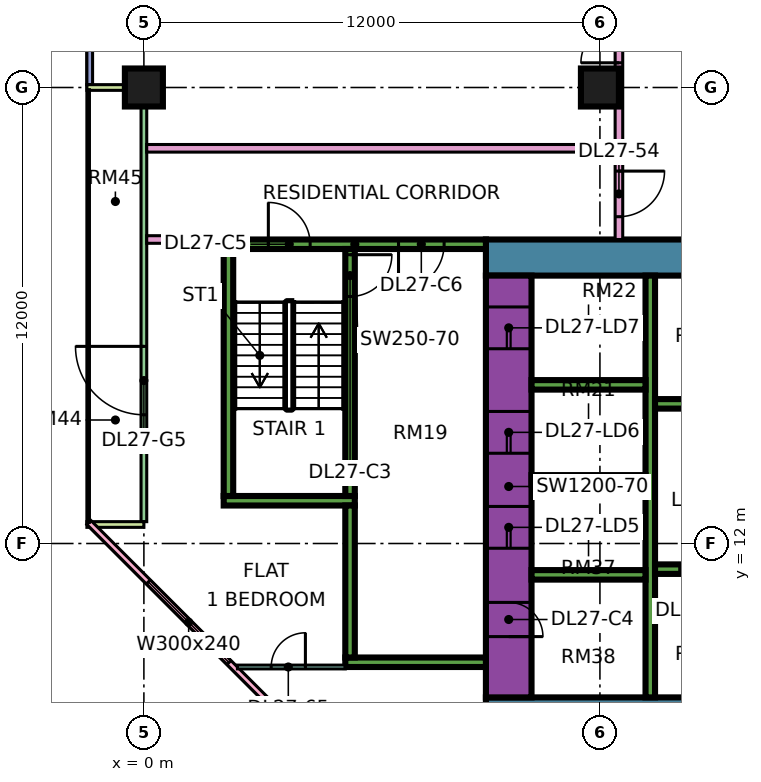
"""IFC4 building model, lengths in metres.
Left out: names, types, materials, properties, quantities, classifications, styles, units other than length and angle.
Written with IfcOpenShell. Run it as: python <this file> out.ifc"""

import sys

from ifc_helpers import new_model, si_unit, direction, frame, frame_2d, origin, origin_2d, place, context, subcontext, project, spatial, rectangle, extrude, element, fill, save


model = new_model("IFC4")
c1 = context("Model", 3, precision=1e-05, world=origin(), true_north=direction((0.0, 1.0)))
c2 = subcontext(c1, "Body", "Model", "MODEL_VIEW")
j1 = project(units=[si_unit("LENGTHUNIT", "METRE"), si_unit("PLANEANGLEUNIT", "RADIAN")], contexts=[c1])
p1 = place(None, origin())
s1 = spatial("IfcSite", under=j1, at=p1, CompositionType="ELEMENT")
p2 = place(p1, origin())
s2 = spatial("IfcBuilding", under=s1, at=p2, CompositionType="ELEMENT")
p3 = place(p2, frame((0.0, 0.0, 118.15)))
s3 = spatial("IfcBuildingStorey", under=s2, at=p3, CompositionType="ELEMENT", Elevation=118.15)
for number, where, z_axis, x_axis in (
    (1, (0.0, 24.0, 0.0), (0.0, 0.0, 1.0), (1.0, 0.0, 0.0)),
    (2, (12.0, 24.0, 0.0), (0.0, 0.0, 1.0), (1.0, 0.0, 0.0)),
):
    element("IfcColumn", number, at=place(p3, frame(where, z_axis=z_axis, x_axis=x_axis)), inside=s3, PredefinedType="COLUMN", context=c2, shape_type="SweptSolid", body=[
        extrude(rectangle(XDim=1.0, YDim=1.0, at=origin_2d()), origin(), (0.0, 0.0, 1.0), 3.75),
    ])
p4 = place(p3, frame((9.0, 7.475, 0.0), z_axis=(0.0, 0.0, 1.0), x_axis=(1.0, 0.0, 0.0)))
e3 = element("IfcWall", 3, at=p4, inside=s3, PredefinedType="SHEAR", context=c2, shape_type="SweptSolid", body=[
    extrude(rectangle(XDim=25.0, YDim=0.95, at=frame_2d((12.5, 0.0))), origin(), (0.0, 0.0, 1.0), 3.75),
])
p5 = place(p3, frame((9.0, 19.525, 0.0), z_axis=(0.0, 0.0, 1.0), x_axis=(1.0, 0.0, 0.0)))
e4 = element("IfcWall", 4, at=p5, inside=s3, PredefinedType="SHEAR", context=c2, shape_type="SweptSolid", body=[
    extrude(rectangle(XDim=25.0, YDim=0.95, at=frame_2d((12.5, 0.0))), origin(), (0.0, 0.0, 1.0), 3.75),
])
p6 = place(p5, frame((19.1, 0.0, 0.0)))
e5 = element("IfcOpeningElement", 5, at=p6, cuts=e4, PredefinedType="OPENING", context=c2, shape_type="SweptSolid", body=[
    extrude(rectangle(XDim=1.8, YDim=2.4, at=frame_2d((0.9, 1.2))), frame((0.0, 0.485, 0.0), z_axis=(0.0, -1.0, 0.0), x_axis=(1.0, 0.0, 0.0)), (0.0, 0.0, 1.0), 0.97),
])
p7 = place(p3, frame((9.6, 7.95, 0.0), z_axis=(0.0, 0.0, 1.0), x_axis=(0.0, 1.0, 0.0)))
e6 = element("IfcWall", 6, at=p7, inside=s3, PredefinedType="SHEAR", context=c2, shape_type="SweptSolid", body=[
    extrude(rectangle(XDim=11.1, YDim=1.2, at=frame_2d((5.55, 0.0))), origin(), (0.0, 0.0, 1.0), 3.75),
])
p8 = place(p7, frame((3.925, 0.0, 0.0)))
e7 = element("IfcOpeningElement", 7, at=p8, cuts=e6, PredefinedType="OPENING", context=c2, shape_type="SweptSolid", body=[
    extrude(rectangle(XDim=1.1, YDim=2.2, at=frame_2d((0.55, 1.1))), frame((0.0, 0.61, 0.0), z_axis=(0.0, -1.0, 0.0), x_axis=(1.0, 0.0, 0.0)), (0.0, 0.0, 1.0), 1.22),
])
p9 = place(p7, frame((6.425, 0.0, 0.0)))
e8 = element("IfcOpeningElement", 8, at=p9, cuts=e6, PredefinedType="OPENING", context=c2, shape_type="SweptSolid", body=[
    extrude(rectangle(XDim=1.1, YDim=2.2, at=frame_2d((0.55, 1.1))), frame((0.0, 0.61, 0.0), z_axis=(0.0, -1.0, 0.0), x_axis=(1.0, 0.0, 0.0)), (0.0, 0.0, 1.0), 1.22),
])
p10 = place(p7, frame((9.175, 0.0, 0.0)))
e9 = element("IfcOpeningElement", 9, at=p10, cuts=e6, PredefinedType="OPENING", context=c2, shape_type="SweptSolid", body=[
    extrude(rectangle(XDim=1.1, YDim=2.2, at=frame_2d((0.55, 1.1))), frame((0.0, 0.61, 0.0), z_axis=(0.0, -1.0, 0.0), x_axis=(1.0, 0.0, 0.0)), (0.0, 0.0, 1.0), 1.22),
])
p11 = place(p7, frame((1.6, 0.0, 0.0)))
e10 = element("IfcOpeningElement", 10, at=p11, cuts=e6, PredefinedType="OPENING", context=c2, shape_type="SweptSolid", body=[
    extrude(rectangle(XDim=0.9, YDim=2.1, at=frame_2d((0.45, 1.05))), frame((0.0, 0.61, 0.0), z_axis=(0.0, -1.0, 0.0), x_axis=(1.0, 0.0, 0.0)), (0.0, 0.0, 1.0), 1.22),
])
p12 = place(p3, frame((13.325, 7.95, 0.0), z_axis=(0.0, 0.0, 1.0), x_axis=(0.0, 1.0, 0.0)))
e11 = element("IfcWall", 11, at=p12, inside=s3, PredefinedType="SHEAR", context=c2, shape_type="SweptSolid", body=[
    extrude(rectangle(XDim=11.1, YDim=0.25, at=frame_2d((5.55, 0.0))), origin(), (0.0, 0.0, 1.0), 3.75),
])
p13 = place(p3, frame((13.45, 11.325, 0.0), z_axis=(0.0, 0.0, 1.0), x_axis=(1.0, 0.0, 0.0)))
e12 = element("IfcWall", 12, at=p13, inside=s3, PredefinedType="SHEAR", context=c2, shape_type="SweptSolid", body=[
    extrude(rectangle(XDim=19.6, YDim=0.25, at=frame_2d((9.8, 0.0))), origin(), (0.0, 0.0, 1.0), 3.75),
])
p14 = place(p13, frame((0.65, 0.0, 0.0)))
e13 = element("IfcOpeningElement", 13, at=p14, cuts=e12, PredefinedType="OPENING", context=c2, shape_type="SweptSolid", body=[
    extrude(rectangle(XDim=1.2, YDim=2.2, at=frame_2d((0.6, 1.1))), frame((0.0, 0.135, 0.0), z_axis=(0.0, -1.0, 0.0), x_axis=(1.0, 0.0, 0.0)), (0.0, 0.0, 1.0), 0.27),
])
p15 = place(p13, frame((3.4, 0.0, 0.0)))
e14 = element("IfcOpeningElement", 14, at=p15, cuts=e12, PredefinedType="OPENING", context=c2, shape_type="SweptSolid", body=[
    extrude(rectangle(XDim=1.2, YDim=2.2, at=frame_2d((0.6, 1.1))), frame((0.0, 0.135, 0.0), z_axis=(0.0, -1.0, 0.0), x_axis=(1.0, 0.0, 0.0)), (0.0, 0.0, 1.0), 0.27),
])
p16 = place(p13, frame((6.15, 0.0, 0.0)))
e15 = element("IfcOpeningElement", 15, at=p16, cuts=e12, PredefinedType="OPENING", context=c2, shape_type="SweptSolid", body=[
    extrude(rectangle(XDim=1.2, YDim=2.2, at=frame_2d((0.6, 1.1))), frame((0.0, 0.135, 0.0), z_axis=(0.0, -1.0, 0.0), x_axis=(1.0, 0.0, 0.0)), (0.0, 0.0, 1.0), 0.27),
])
p17 = place(p13, frame((8.9, 0.0, 0.0)))
e16 = element("IfcOpeningElement", 16, at=p17, cuts=e12, PredefinedType="OPENING", context=c2, shape_type="SweptSolid", body=[
    extrude(rectangle(XDim=1.2, YDim=2.2, at=frame_2d((0.6, 1.1))), frame((0.0, 0.135, 0.0), z_axis=(0.0, -1.0, 0.0), x_axis=(1.0, 0.0, 0.0)), (0.0, 0.0, 1.0), 0.27),
])
p18 = place(p3, frame((13.45, 15.675, 0.0), z_axis=(0.0, 0.0, 1.0), x_axis=(1.0, 0.0, 0.0)))
e17 = element("IfcWall", 17, at=p18, inside=s3, PredefinedType="SHEAR", context=c2, shape_type="SweptSolid", body=[
    extrude(rectangle(XDim=13.75, YDim=0.25, at=frame_2d((6.875, 0.0))), origin(), (0.0, 0.0, 1.0), 3.75),
])
for number, where, z_axis, x_axis in (
    (18, (10.2, 11.175, 0.0), (0.0, 0.0, 1.0), (1.0, 0.0, 0.0)),
    (19, (10.2, 13.675, 0.0), (0.0, 0.0, 1.0), (1.0, 0.0, 0.0)),
    (20, (10.2, 16.175, 0.0), (0.0, 0.0, 1.0), (1.0, 0.0, 0.0)),
):
    element("IfcWall", number, at=place(p3, frame(where, z_axis=z_axis, x_axis=x_axis)), inside=s3, PredefinedType="SHEAR", context=c2, shape_type="SweptSolid", body=[
        extrude(rectangle(XDim=3.0, YDim=0.25, at=frame_2d((1.5, 0.0))), origin(), (0.0, 0.0, 1.0), 3.75),
    ])
p19 = place(p3, frame((2.1, 19.875, 0.0), z_axis=(0.0, 0.0, 1.0), x_axis=(1.0, 0.0, 0.0)))
e21 = element("IfcWall", 21, at=p19, inside=s3, PredefinedType="SHEAR", context=c2, shape_type="SweptSolid", body=[
    extrude(rectangle(XDim=6.9, YDim=0.25, at=frame_2d((3.45, 0.0))), origin(), (0.0, 0.0, 1.0), 3.75),
])
p20 = place(p19, frame((1.175, 0.0, 0.0)))
e22 = element("IfcOpeningElement", 22, at=p20, cuts=e21, PredefinedType="OPENING", context=c2, shape_type="SweptSolid", body=[
    extrude(rectangle(XDim=1.1, YDim=2.2, at=frame_2d((0.55, 1.1))), frame((0.0, 0.135, 0.0), z_axis=(0.0, -1.0, 0.0), x_axis=(1.0, 0.0, 0.0)), (0.0, 0.0, 1.0), 0.27),
])
p21 = place(p19, frame((4.6, 0.0, 0.0)))
e23 = element("IfcOpeningElement", 23, at=p21, cuts=e21, PredefinedType="OPENING", context=c2, shape_type="SweptSolid", body=[
    extrude(rectangle(XDim=1.2, YDim=2.2, at=frame_2d((0.6, 1.1))), frame((0.0, 0.135, 0.0), z_axis=(0.0, -1.0, 0.0), x_axis=(1.0, 0.0, 0.0)), (0.0, 0.0, 1.0), 0.27),
])
p22 = place(p3, frame((2.1, 13.125, 0.0), z_axis=(0.0, 0.0, 1.0), x_axis=(1.0, 0.0, 0.0)))
e24 = element("IfcWall", 24, at=p22, inside=s3, PredefinedType="SHEAR", context=c2, shape_type="SweptSolid", body=[
    extrude(rectangle(XDim=3.45, YDim=0.25, at=frame_2d((1.725, 0.0))), origin(), (0.0, 0.0, 1.0), 3.75),
])
p23 = place(p3, frame((2.225, 13.25, 0.0), z_axis=(0.0, 0.0, 1.0), x_axis=(0.0, 1.0, 0.0)))
e25 = element("IfcWall", 25, at=p23, inside=s3, PredefinedType="SHEAR", context=c2, shape_type="SweptSolid", body=[
    extrude(rectangle(XDim=6.5, YDim=0.25, at=frame_2d((3.25, 0.0))), origin(), (0.0, 0.0, 1.0), 3.75),
])
p24 = place(p3, frame((5.425, 13.25, 0.0), z_axis=(0.0, 0.0, 1.0), x_axis=(0.0, 1.0, 0.0)))
e26 = element("IfcWall", 26, at=p24, inside=s3, PredefinedType="SHEAR", context=c2, shape_type="SweptSolid", body=[
    extrude(rectangle(XDim=6.5, YDim=0.25, at=frame_2d((3.25, 0.0))), origin(), (0.0, 0.0, 1.0), 3.75),
])
p25 = place(p24, frame((5.25, 0.0, 0.0)))
e27 = element("IfcOpeningElement", 27, at=p25, cuts=e26, PredefinedType="OPENING", context=c2, shape_type="SweptSolid", body=[
    extrude(rectangle(XDim=1.1, YDim=2.2, at=frame_2d((0.55, 1.1))), frame((0.0, 0.135, 0.0), z_axis=(0.0, -1.0, 0.0), x_axis=(1.0, 0.0, 0.0)), (0.0, 0.0, 1.0), 0.27),
])
p26 = place(p3, frame((5.3, 8.875, 0.0), z_axis=(0.0, 0.0, 1.0), x_axis=(1.0, 0.0, 0.0)))
e28 = element("IfcWall", 28, at=p26, inside=s3, PredefinedType="SHEAR", context=c2, shape_type="SweptSolid", body=[
    extrude(rectangle(XDim=3.7, YDim=0.25, at=frame_2d((1.85, 0.0))), origin(), (0.0, 0.0, 1.0), 3.75),
])
p27 = place(p3, frame((5.425, 9.0, 0.0), z_axis=(0.0, 0.0, 1.0), x_axis=(0.0, 1.0, 0.0)))
e29 = element("IfcWall", 29, at=p27, inside=s3, PredefinedType="SHEAR", context=c2, shape_type="SweptSolid", body=[
    extrude(rectangle(XDim=4.0, YDim=0.25, at=frame_2d((2.0, 0.0))), origin(), (0.0, 0.0, 1.0), 3.75),
])
p28 = place(p3, frame((-1.425, 35.925, 0.0), z_axis=(0.0, 0.0, 1.0), x_axis=(0.0, -1.0, 0.0)))
e30 = element("IfcWall", 30, at=p28, inside=s3, PredefinedType="SOLIDWALL", context=c2, shape_type="SweptSolid", body=[
    extrude(rectangle(XDim=11.85, YDim=0.15, at=frame_2d((5.925, 0.0))), origin(), (0.0, 0.0, 1.0), 3.35),
])
p29 = place(p28, frame((0.562, 0.0, 0.45)))
e31 = element("IfcOpeningElement", 31, at=p29, cuts=e30, PredefinedType="OPENING", context=c2, shape_type="SweptSolid", body=[
    extrude(rectangle(XDim=1.8, YDim=2.4, at=frame_2d((0.9, 1.2))), frame((0.0, 0.085, 0.0), z_axis=(0.0, -1.0, 0.0), x_axis=(1.0, 0.0, 0.0)), (0.0, 0.0, 1.0), 0.17),
])
p30 = place(p28, frame((3.525, 0.0, 0.45)))
e32 = element("IfcOpeningElement", 32, at=p30, cuts=e30, PredefinedType="OPENING", context=c2, shape_type="SweptSolid", body=[
    extrude(rectangle(XDim=1.8, YDim=2.4, at=frame_2d((0.9, 1.2))), frame((0.0, 0.085, 0.0), z_axis=(0.0, -1.0, 0.0), x_axis=(1.0, 0.0, 0.0)), (0.0, 0.0, 1.0), 0.17),
])
p31 = place(p28, frame((7.387, 0.0, 0.45)))
e33 = element("IfcOpeningElement", 33, at=p31, cuts=e30, PredefinedType="OPENING", context=c2, shape_type="SweptSolid", body=[
    extrude(rectangle(XDim=3.0, YDim=2.4, at=frame_2d((1.5, 1.2))), frame((0.0, 0.085, 0.0), z_axis=(0.0, -1.0, 0.0), x_axis=(1.0, 0.0, 0.0)), (0.0, 0.0, 1.0), 0.17),
])
p32 = place(p3, frame((0.0, 23.925, 0.0), z_axis=(0.0, 0.0, 1.0), x_axis=(0.0, -1.0, 0.0)))
e34 = element("IfcWall", 34, at=p32, inside=s3, PredefinedType="SOLIDWALL", context=c2, shape_type="SweptSolid", body=[
    extrude(rectangle(XDim=11.35, YDim=0.15, at=frame_2d((5.675, 0.0))), origin(), (0.0, 0.0, 1.0), 3.35),
])
p33 = place(p32, frame((6.738, 0.0, 0.0)))
e35 = element("IfcOpeningElement", 35, at=p33, cuts=e34, PredefinedType="OPENING", context=c2, shape_type="SweptSolid", body=[
    extrude(rectangle(XDim=1.8, YDim=2.4, at=frame_2d((0.9, 1.2))), frame((0.0, 0.085, 0.0), z_axis=(0.0, -1.0, 0.0), x_axis=(1.0, 0.0, 0.0)), (0.0, 0.0, 1.0), 0.17),
])
for number, where, z_axis, x_axis in (
    (36, (-1.5, 24.0, 0.0), (0.0, 0.0, 1.0), (1.0, 0.0, 0.0)),
    (37, (-1.5, 12.5, 0.0), (0.0, 0.0, 1.0), (1.0, 0.0, 0.0)),
):
    element("IfcWall", number, at=place(p3, frame(where, z_axis=z_axis, x_axis=x_axis)), inside=s3, PredefinedType="SOLIDWALL", context=c2, shape_type="SweptSolid", body=[
        extrude(rectangle(XDim=1.5, YDim=0.15, at=frame_2d((0.75, 0.0))), origin(), (0.0, 0.0, 1.0), 3.35),
    ])
p34 = place(p3, frame((-1.447, 12.553, 0.0), z_axis=(0.0, 0.0, 1.0), x_axis=(0.707106781187, -0.707106781187, 0.0)))
e38 = element("IfcWall", 38, at=p34, inside=s3, PredefinedType="SOLIDWALL", context=c2, shape_type="SweptSolid", body=[
    extrude(rectangle(XDim=19.799, YDim=0.15, at=frame_2d((9.899, 0.0))), origin(), (0.0, 0.0, 1.0), 3.35),
])
p35 = place(p34, frame((2.212, 0.0, 0.45)))
e39 = element("IfcOpeningElement", 39, at=p35, cuts=e38, PredefinedType="OPENING", context=c2, shape_type="SweptSolid", body=[
    extrude(rectangle(XDim=3.0, YDim=2.4, at=frame_2d((1.5, 1.2))), frame((0.0, 0.085, 0.0), z_axis=(0.0, -1.0, 0.0), x_axis=(1.0, 0.0, 0.0)), (0.0, 0.0, 1.0), 0.17),
])
p36 = place(p34, frame((10.216, 0.0, 0.45)))
e40 = element("IfcOpeningElement", 40, at=p36, cuts=e38, PredefinedType="OPENING", context=c2, shape_type="SweptSolid", body=[
    extrude(rectangle(XDim=3.0, YDim=2.4, at=frame_2d((1.5, 1.2))), frame((0.0, 0.085, 0.0), z_axis=(0.0, -1.0, 0.0), x_axis=(1.0, 0.0, 0.0)), (0.0, 0.0, 1.0), 0.17),
])
p37 = place(p3, frame((0.074, 20.0, 0.0), z_axis=(0.0, 0.0, 1.0), x_axis=(1.0, 0.0, 0.0)))
e41 = element("IfcWall", 41, at=p37, inside=s3, PredefinedType="PARTITIONING", context=c2, shape_type="SweptSolid", body=[
    extrude(rectangle(XDim=2.026, YDim=0.2, at=frame_2d((1.013, 0.0))), origin(), (0.0, 0.0, 1.0), 3.35),
])
p38 = place(p3, frame((0.074, 22.4, 0.0), z_axis=(0.0, 0.0, 1.0), x_axis=(1.0, 0.0, 0.0)))
e42 = element("IfcWall", 42, at=p38, inside=s3, PredefinedType="PARTITIONING", context=c2, shape_type="SweptSolid", body=[
    extrude(rectangle(XDim=12.326, YDim=0.2, at=frame_2d((6.163, 0.0))), origin(), (0.0, 0.0, 1.0), 3.35),
])
p39 = place(p3, frame((2.461, 8.75, 0.0), z_axis=(0.0, 0.0, 1.0), x_axis=(1.0, 0.0, 0.0)))
e43 = element("IfcWall", 43, at=p39, inside=s3, PredefinedType="PARTITIONING", context=c2, shape_type="SweptSolid", body=[
    extrude(rectangle(XDim=2.839, YDim=0.1, at=frame_2d((1.419, 0.0))), origin(), (0.0, 0.0, 1.0), 3.35),
])
p40 = place(p39, frame((0.889, 0.0, 0.0)))
e44 = element("IfcOpeningElement", 44, at=p40, cuts=e43, PredefinedType="OPENING", context=c2, shape_type="SweptSolid", body=[
    extrude(rectangle(XDim=0.9, YDim=2.1, at=frame_2d((0.45, 1.05))), frame((0.0, 0.06, 0.0), z_axis=(0.0, -1.0, 0.0), x_axis=(1.0, 0.0, 0.0)), (0.0, 0.0, 1.0), 0.12),
])
p41 = place(p3, frame((12.5, 20.0, 0.0), z_axis=(0.0, 0.0, 1.0), x_axis=(0.0, 1.0, 0.0)))
e45 = element("IfcWall", 45, at=p41, inside=s3, PredefinedType="PARTITIONING", context=c2, shape_type="SweptSolid", body=[
    extrude(rectangle(XDim=42.926, YDim=0.2, at=frame_2d((21.463, 0.0))), origin(), (0.0, 0.0, 1.0), 3.35),
])
p42 = place(p41, frame((28.65, 0.0, 0.0)))
e46 = element("IfcOpeningElement", 46, at=p42, cuts=e45, PredefinedType="OPENING", context=c2, shape_type="SweptSolid", body=[
    extrude(rectangle(XDim=1.0, YDim=2.1, at=frame_2d((0.5, 1.05))), frame((0.0, 0.11, 0.0), z_axis=(0.0, -1.0, 0.0), x_axis=(1.0, 0.0, 0.0)), (0.0, 0.0, 1.0), 0.22),
])
p43 = place(p41, frame((31.95, 0.0, 0.0)))
e47 = element("IfcOpeningElement", 47, at=p43, cuts=e45, PredefinedType="OPENING", context=c2, shape_type="SweptSolid", body=[
    extrude(rectangle(XDim=1.0, YDim=2.1, at=frame_2d((0.5, 1.05))), frame((0.0, 0.11, 0.0), z_axis=(0.0, -1.0, 0.0), x_axis=(1.0, 0.0, 0.0)), (0.0, 0.0, 1.0), 0.22),
])
p44 = place(p41, frame((0.6, 0.0, 0.0)))
e48 = element("IfcOpeningElement", 48, at=p44, cuts=e45, PredefinedType="OPENING", context=c2, shape_type="SweptSolid", body=[
    extrude(rectangle(XDim=1.2, YDim=2.1, at=frame_2d((0.6, 1.05))), frame((0.0, 0.11, 0.0), z_axis=(0.0, -1.0, 0.0), x_axis=(1.0, 0.0, 0.0)), (0.0, 0.0, 1.0), 0.22),
])
p45 = place(p41, frame((4.65, 0.0, 0.0)))
e49 = element("IfcOpeningElement", 49, at=p45, cuts=e45, PredefinedType="OPENING", context=c2, shape_type="SweptSolid", body=[
    extrude(rectangle(XDim=1.0, YDim=2.1, at=frame_2d((0.5, 1.05))), frame((0.0, 0.11, 0.0), z_axis=(0.0, -1.0, 0.0), x_axis=(1.0, 0.0, 0.0)), (0.0, 0.0, 1.0), 0.22),
])
p46 = place(p33, frame((1.8, 0.0, 0.0), z_axis=(0.0, 0.0, 1.0), x_axis=(-1.0, 0.0, 0.0)))
e50 = element("IfcDoor", 50, at=p46, inside=s3, OperationType="DOUBLE_DOOR_SINGLE_SWING", PredefinedType="DOOR", context=c2, shape_type="SweptSolid", body=[
    extrude(rectangle(XDim=1.8, YDim=2.4, at=frame_2d((0.9, 1.2))), frame((0.0, 0.025, 0.0), z_axis=(0.0, -1.0, 0.0), x_axis=(1.0, 0.0, 0.0)), (0.0, 0.0, 1.0), 0.05),
])
fill(e35, e50)
p47 = place(p35, origin())
e51 = element("IfcWindow", 51, at=p47, inside=s3, PartitioningType="SINGLE_PANEL", PredefinedType="WINDOW", context=c2, shape_type="SweptSolid", body=[
    extrude(rectangle(XDim=3.0, YDim=2.4, at=frame_2d((1.5, 1.2))), frame((0.0, 0.03, 0.0), z_axis=(0.0, -1.0, 0.0), x_axis=(1.0, 0.0, 0.0)), (0.0, 0.0, 1.0), 0.06),
])
fill(e39, e51)
p48 = place(p14, origin())
e52 = element("IfcDoor", 52, at=p48, inside=s3, OperationType="DOUBLE_DOOR_SLIDING", PredefinedType="DOOR", context=c2, shape_type="SweptSolid", body=[
    extrude(rectangle(XDim=1.2, YDim=2.2, at=frame_2d((0.6, 1.1))), frame((0.0, 0.025, 0.0), z_axis=(0.0, -1.0, 0.0), x_axis=(1.0, 0.0, 0.0)), (0.0, 0.0, 1.0), 0.05),
])
fill(e13, e52)
p49 = place(p8, origin())
e53 = element("IfcDoor", 53, at=p49, inside=s3, OperationType="DOUBLE_DOOR_SLIDING", PredefinedType="DOOR", context=c2, shape_type="SweptSolid", body=[
    extrude(rectangle(XDim=1.1, YDim=2.2, at=frame_2d((0.55, 1.1))), frame((0.0, 0.025, 0.0), z_axis=(0.0, -1.0, 0.0), x_axis=(1.0, 0.0, 0.0)), (0.0, 0.0, 1.0), 0.05),
])
fill(e7, e53)
p50 = place(p9, origin())
e54 = element("IfcDoor", 54, at=p50, inside=s3, OperationType="DOUBLE_DOOR_SLIDING", PredefinedType="DOOR", context=c2, shape_type="SweptSolid", body=[
    extrude(rectangle(XDim=1.1, YDim=2.2, at=frame_2d((0.55, 1.1))), frame((0.0, 0.025, 0.0), z_axis=(0.0, -1.0, 0.0), x_axis=(1.0, 0.0, 0.0)), (0.0, 0.0, 1.0), 0.05),
])
fill(e8, e54)
p51 = place(p10, origin())
e55 = element("IfcDoor", 55, at=p51, inside=s3, OperationType="DOUBLE_DOOR_SLIDING", PredefinedType="DOOR", context=c2, shape_type="SweptSolid", body=[
    extrude(rectangle(XDim=1.1, YDim=2.2, at=frame_2d((0.55, 1.1))), frame((0.0, 0.025, 0.0), z_axis=(0.0, -1.0, 0.0), x_axis=(1.0, 0.0, 0.0)), (0.0, 0.0, 1.0), 0.05),
])
fill(e9, e55)
p52 = place(p25, origin())
e56 = element("IfcDoor", 56, at=p52, inside=s3, OperationType="SINGLE_SWING_RIGHT", PredefinedType="DOOR", context=c2, shape_type="SweptSolid", body=[
    extrude(rectangle(XDim=1.1, YDim=2.2, at=frame_2d((0.55, 1.1))), frame((0.0, 0.025, 0.0), z_axis=(0.0, -1.0, 0.0), x_axis=(1.0, 0.0, 0.0)), (0.0, 0.0, 1.0), 0.05),
])
fill(e27, e56)
p53 = place(p11, frame((0.9, 0.0, 0.0), z_axis=(0.0, 0.0, 1.0), x_axis=(-1.0, 0.0, 0.0)))
e57 = element("IfcDoor", 57, at=p53, inside=s3, OperationType="SINGLE_SWING_LEFT", PredefinedType="DOOR", context=c2, shape_type="SweptSolid", body=[
    extrude(rectangle(XDim=0.9, YDim=2.1, at=frame_2d((0.45, 1.05))), frame((0.0, 0.025, 0.0), z_axis=(0.0, -1.0, 0.0), x_axis=(1.0, 0.0, 0.0)), (0.0, 0.0, 1.0), 0.05),
])
fill(e10, e57)
p54 = place(p20, origin())
e58 = element("IfcDoor", 58, at=p54, inside=s3, OperationType="SINGLE_SWING_LEFT", PredefinedType="DOOR", context=c2, shape_type="SweptSolid", body=[
    extrude(rectangle(XDim=1.1, YDim=2.2, at=frame_2d((0.55, 1.1))), frame((0.0, 0.025, 0.0), z_axis=(0.0, -1.0, 0.0), x_axis=(1.0, 0.0, 0.0)), (0.0, 0.0, 1.0), 0.05),
])
fill(e22, e58)
p55 = place(p21, frame((1.2, 0.0, 0.0), z_axis=(0.0, 0.0, 1.0), x_axis=(-1.0, 0.0, 0.0)))
e59 = element("IfcDoor", 59, at=p55, inside=s3, OperationType="SINGLE_SWING_LEFT", PredefinedType="DOOR", context=c2, shape_type="SweptSolid", body=[
    extrude(rectangle(XDim=1.2, YDim=2.2, at=frame_2d((0.6, 1.1))), frame((0.0, 0.025, 0.0), z_axis=(0.0, -1.0, 0.0), x_axis=(1.0, 0.0, 0.0)), (0.0, 0.0, 1.0), 0.05),
])
fill(e23, e59)
p56 = place(p44, origin())
e60 = element("IfcDoor", 60, at=p56, inside=s3, OperationType="SINGLE_SWING_RIGHT", PredefinedType="DOOR", context=c2, shape_type="SweptSolid", body=[
    extrude(rectangle(XDim=1.2, YDim=2.1, at=frame_2d((0.6, 1.05))), frame((0.0, 0.025, 0.0), z_axis=(0.0, -1.0, 0.0), x_axis=(1.0, 0.0, 0.0)), (0.0, 0.0, 1.0), 0.05),
])
fill(e48, e60)
p57 = place(p40, frame((0.9, 0.0, 0.0), z_axis=(0.0, 0.0, 1.0), x_axis=(-1.0, 0.0, 0.0)))
e61 = element("IfcDoor", 61, at=p57, inside=s3, OperationType="SINGLE_SWING_RIGHT", PredefinedType="DOOR", context=c2, shape_type="SweptSolid", body=[
    extrude(rectangle(XDim=0.9, YDim=2.1, at=frame_2d((0.45, 1.05))), frame((0.0, 0.025, 0.0), z_axis=(0.0, -1.0, 0.0), x_axis=(1.0, 0.0, 0.0)), (0.0, 0.0, 1.0), 0.05),
])
fill(e44, e61)
p58 = place(p45, origin())
e62 = element("IfcDoor", 62, at=p58, inside=s3, OperationType="SINGLE_SWING_LEFT", PredefinedType="DOOR", context=c2, shape_type="SweptSolid", body=[
    extrude(rectangle(XDim=1.0, YDim=2.1, at=frame_2d((0.5, 1.05))), frame((0.0, 0.025, 0.0), z_axis=(0.0, -1.0, 0.0), x_axis=(1.0, 0.0, 0.0)), (0.0, 0.0, 1.0), 0.05),
])
fill(e49, e62)
save(model, sys.argv[1])
